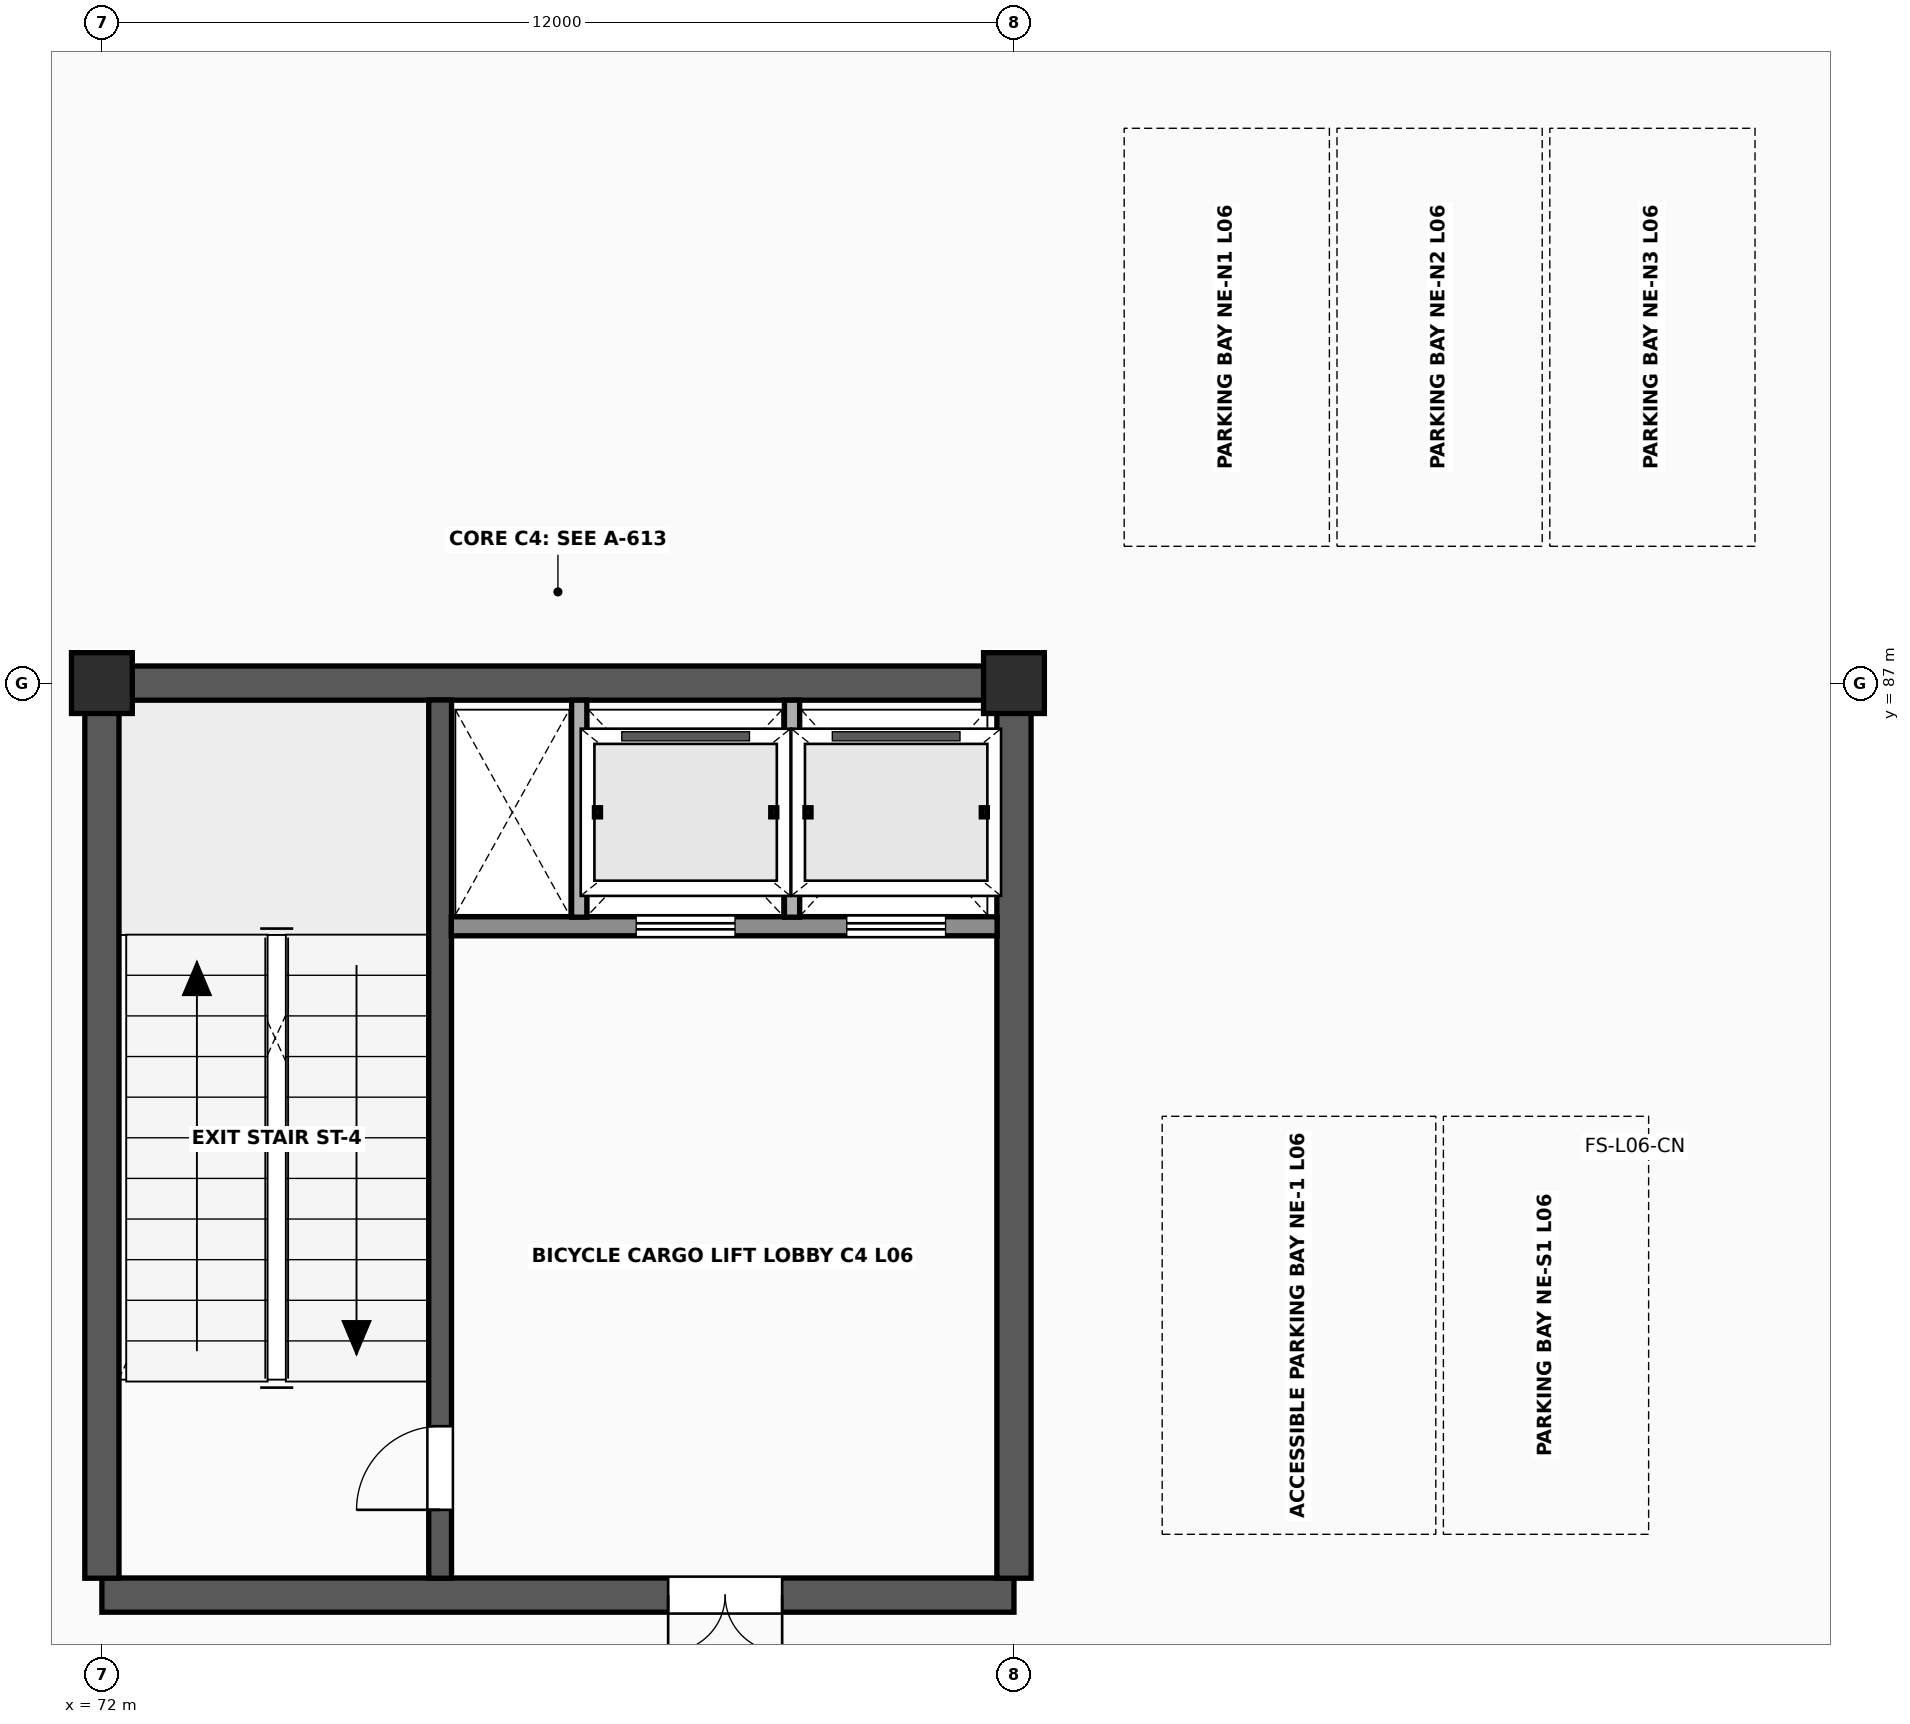
"""IFC4 building model, lengths in metres.
Left out: names, types, materials, properties, quantities, classifications, styles, units other than length and angle.
Written with IfcOpenShell. Run it as: python <this file> out.ifc"""

import sys

from ifc_helpers import new_model, si_unit, direction, frame, frame_2d, origin, origin_2d, place, context, subcontext, project, spatial, rectangle, extrude, element, fill, save


model = new_model("IFC4")
c1 = context("Model", 3, precision=1e-05, world=origin(), true_north=direction((0.0, 1.0)))
c2 = subcontext(c1, "Body", "Model", "MODEL_VIEW")
j1 = project(units=[si_unit("LENGTHUNIT", "METRE"), si_unit("PLANEANGLEUNIT", "RADIAN")], contexts=[c1])
p1 = place(None, origin())
s1 = spatial("IfcSite", under=j1, at=p1, CompositionType="ELEMENT")
p2 = place(p1, origin())
s2 = spatial("IfcBuilding", under=s1, at=p2, CompositionType="ELEMENT")
p3 = place(p2, frame((0.0, 0.0, 24.8)))
s3 = spatial("IfcBuildingStorey", under=s2, at=p3, CompositionType="ELEMENT", Elevation=24.8)
for number, where, z_axis, x_axis in (
    (1, (72.0, 87.0, 0.0), (0.0, 0.0, 1.0), (1.0, 0.0, 0.0)),
    (2, (84.0, 87.0, 0.0), (0.0, 0.0, 1.0), (1.0, 0.0, 0.0)),
):
    element("IfcColumn", number, at=place(p3, frame(where, z_axis=z_axis, x_axis=x_axis)), inside=s3, PredefinedType="COLUMN", context=c2, shape_type="SweptSolid", body=[
        extrude(rectangle(XDim=0.8, YDim=0.8, at=origin_2d()), origin(), (0.0, 0.0, 1.0), 3.8),
    ])
p4 = place(p3, frame((72.0, 75.0, 0.0), z_axis=(0.0, 0.0, 1.0), x_axis=(1.0, 0.0, 0.0)))
e3 = element("IfcWall", 3, at=p4, inside=s3, PredefinedType="SHEAR", context=c2, shape_type="SweptSolid", body=[
    extrude(rectangle(XDim=12.0, YDim=0.45, at=frame_2d((6.0, 0.0))), origin(), (0.0, 0.0, 1.0), 3.628),
])
p5 = place(p4, frame((7.45, 0.0, 0.0)))
e4 = element("IfcOpeningElement", 4, at=p5, cuts=e3, PredefinedType="OPENING", context=c2, shape_type="SweptSolid", body=[
    extrude(rectangle(XDim=1.5, YDim=2.25, at=frame_2d((0.75, 1.125))), frame((0.0, 0.24, 0.0), z_axis=(0.0, -1.0, 0.0), x_axis=(1.0, 0.0, 0.0)), (0.0, 0.0, 1.0), 0.48),
])
p6 = place(p3, frame((72.397, 87.0, 0.0), z_axis=(0.0, 0.0, 1.0), x_axis=(1.0, 0.0, 0.0)))
e5 = element("IfcWall", 5, at=p6, inside=s3, PredefinedType="SHEAR", context=c2, shape_type="SweptSolid", body=[
    extrude(rectangle(XDim=11.206, YDim=0.45, at=frame_2d((5.603, 0.0))), origin(), (0.0, 0.0, 1.0), 3.628),
])
for number, where, z_axis, x_axis in (
    (6, (72.0, 75.222, 0.0), (0.0, 0.0, 1.0), (0.0, 1.0, 0.0)),
    (7, (84.0, 75.222, 0.0), (0.0, 0.0, 1.0), (0.0, 1.0, 0.0)),
):
    element("IfcWall", number, at=place(p3, frame(where, z_axis=z_axis, x_axis=x_axis)), inside=s3, PredefinedType="SHEAR", context=c2, shape_type="SweptSolid", body=[
        extrude(rectangle(XDim=11.381, YDim=0.45, at=frame_2d((5.69, 0.0))), origin(), (0.0, 0.0, 1.0), 3.628),
    ])
p7 = place(p3, frame((76.45, 75.222, 0.0), z_axis=(0.0, 0.0, 1.0), x_axis=(0.0, 1.0, 0.0)))
e8 = element("IfcWall", 8, at=p7, inside=s3, PredefinedType="SHEAR", context=c2, shape_type="SweptSolid", body=[
    extrude(rectangle(XDim=11.556, YDim=0.3, at=frame_2d((5.778, 0.0))), origin(), (0.0, 0.0, 1.0), 3.628),
])
p8 = place(p7, frame((0.9, 0.0, 0.0)))
e9 = element("IfcOpeningElement", 9, at=p8, cuts=e8, PredefinedType="OPENING", context=c2, shape_type="SweptSolid", body=[
    extrude(rectangle(XDim=1.1, YDim=2.2, at=frame_2d((0.55, 1.1))), frame((0.0, 0.165, 0.0), z_axis=(0.0, -1.0, 0.0), x_axis=(1.0, 0.0, 0.0)), (0.0, 0.0, 1.0), 0.33),
])
p9 = place(p3, frame((76.597, 83.8, 0.0), z_axis=(0.0, 0.0, 1.0), x_axis=(1.0, 0.0, 0.0)))
e10 = element("IfcWall", 10, at=p9, inside=s3, PredefinedType="SOLIDWALL", context=c2, shape_type="SweptSolid", body=[
    extrude(rectangle(XDim=7.181, YDim=0.25, at=frame_2d((3.591, 0.0))), origin(), (0.0, 0.0, 1.0), 3.628),
])
p10 = place(p9, frame((2.433, 0.0, 0.0)))
e11 = element("IfcOpeningElement", 11, at=p10, cuts=e10, PredefinedType="OPENING", context=c2, shape_type="SweptSolid", body=[
    extrude(rectangle(XDim=1.3, YDim=2.28, at=frame_2d((0.65, 1.14))), frame((0.0, 0.14, 0.0), z_axis=(0.0, -1.0, 0.0), x_axis=(1.0, 0.0, 0.0)), (0.0, 0.0, 1.0), 0.28),
])
p11 = place(p9, frame((5.203, 0.0, 0.0)))
e12 = element("IfcOpeningElement", 12, at=p11, cuts=e10, PredefinedType="OPENING", context=c2, shape_type="SweptSolid", body=[
    extrude(rectangle(XDim=1.3, YDim=2.28, at=frame_2d((0.65, 1.14))), frame((0.0, 0.14, 0.0), z_axis=(0.0, -1.0, 0.0), x_axis=(1.0, 0.0, 0.0)), (0.0, 0.0, 1.0), 0.28),
])
for number, where, z_axis, x_axis in (
    (13, (78.28, 83.92, 0.0), (0.0, 0.0, 1.0), (0.0, 1.0, 0.0)),
    (14, (81.08, 83.92, 0.0), (0.0, 0.0, 1.0), (0.0, 1.0, 0.0)),
):
    element("IfcWall", number, at=place(p3, frame(where, z_axis=z_axis, x_axis=x_axis)), inside=s3, PredefinedType="SOLIDWALL", context=c2, shape_type="SweptSolid", body=[
        extrude(rectangle(XDim=2.855, YDim=0.2, at=frame_2d((1.427, 0.0))), origin(), (0.0, 0.0, 1.0), 3.618),
    ])
p12 = place(p8, origin())
e15 = element("IfcDoor", 15, at=p12, inside=s3, OperationType="SINGLE_SWING_LEFT", PredefinedType="DOOR", context=c2, shape_type="SweptSolid", body=[
    extrude(rectangle(XDim=1.1, YDim=2.2, at=frame_2d((0.55, 1.1))), frame((0.0, 0.025, 0.0), z_axis=(0.0, -1.0, 0.0), x_axis=(1.0, 0.0, 0.0)), (0.0, 0.0, 1.0), 0.05),
])
fill(e9, e15)
p13 = place(p5, origin())
e16 = element("IfcDoor", 16, at=p13, inside=s3, OperationType="DOUBLE_DOOR_SINGLE_SWING", PredefinedType="DOOR", context=c2, shape_type="SweptSolid", body=[
    extrude(rectangle(XDim=1.5, YDim=2.25, at=frame_2d((0.75, 1.125))), frame((0.0, 0.025, 0.0), z_axis=(0.0, -1.0, 0.0), x_axis=(1.0, 0.0, 0.0)), (0.0, 0.0, 1.0), 0.05),
])
fill(e4, e16)
p14 = place(p10, origin())
e17 = element("IfcDoor", 17, at=p14, inside=s3, OperationType="SLIDING_TO_LEFT", PredefinedType="USERDEFINED", context=c2, shape_type="SweptSolid", body=[
    extrude(rectangle(XDim=1.3, YDim=2.28, at=frame_2d((0.65, 1.14))), frame((0.0, 0.025, 0.0), z_axis=(0.0, -1.0, 0.0), x_axis=(1.0, 0.0, 0.0)), (0.0, 0.0, 1.0), 0.05),
])
fill(e11, e17)
p15 = place(p11, origin())
e18 = element("IfcDoor", 18, at=p15, inside=s3, OperationType="SLIDING_TO_LEFT", PredefinedType="USERDEFINED", context=c2, shape_type="SweptSolid", body=[
    extrude(rectangle(XDim=1.3, YDim=2.28, at=frame_2d((0.65, 1.14))), frame((0.0, 0.025, 0.0), z_axis=(0.0, -1.0, 0.0), x_axis=(1.0, 0.0, 0.0)), (0.0, 0.0, 1.0), 0.05),
])
fill(e12, e18)
save(model, sys.argv[1])
